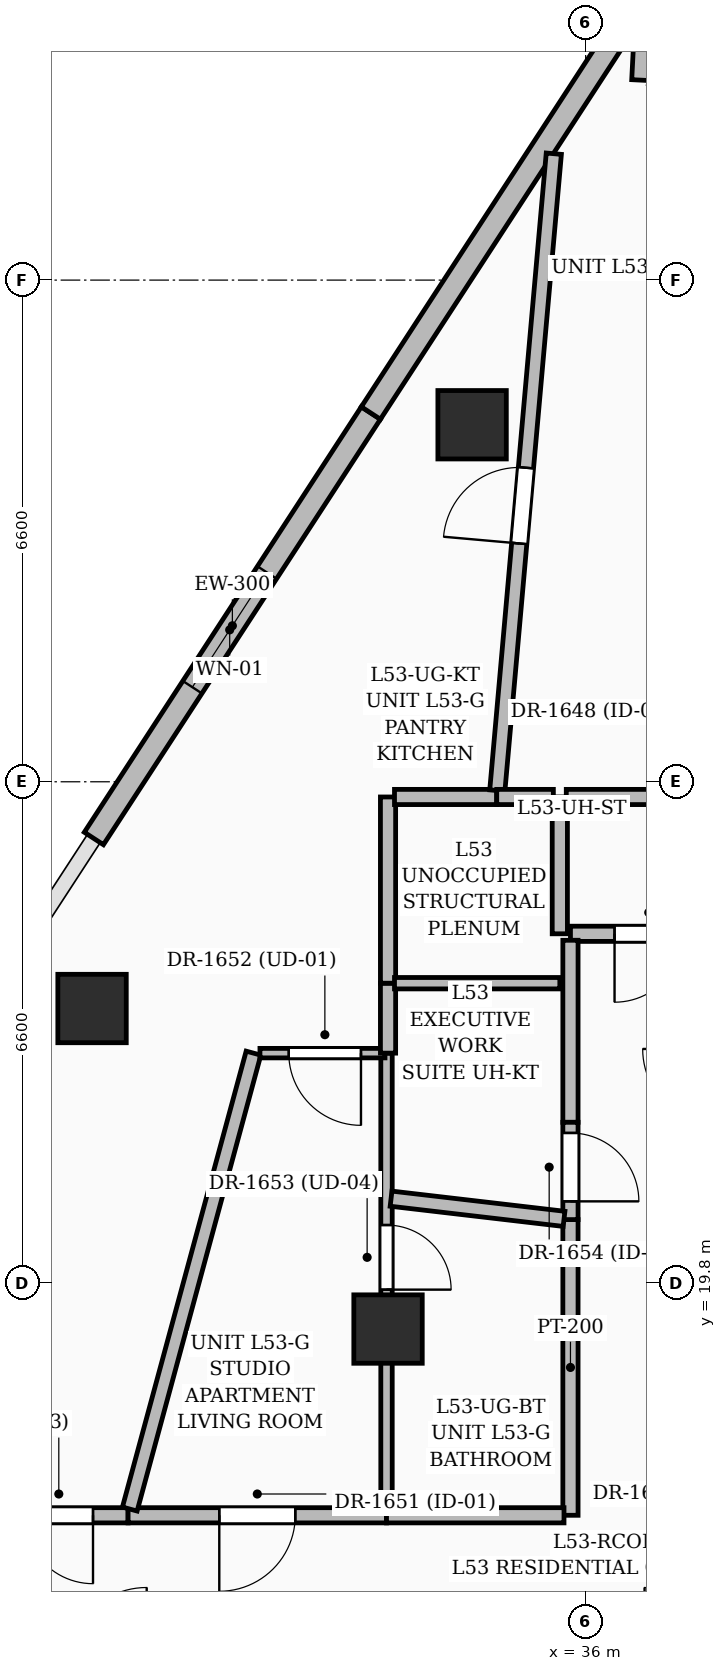
"""IFC4 building model, lengths in metres.
Left out: names, types, materials, properties, quantities, classifications, styles, units other than length and angle.
Written with IfcOpenShell. Run it as: python <this file> out.ifc"""

import sys

from ifc_helpers import new_model, si_unit, direction, frame, frame_2d, origin, origin_2d, place, context, subcontext, project, spatial, rectangle, extrude, element, fill, save


model = new_model("IFC4")
c1 = context("Model", 3, precision=1e-05, world=origin(), true_north=direction((0.0, 1.0)))
c2 = subcontext(c1, "Body", "Model", "MODEL_VIEW")
j1 = project(units=[si_unit("LENGTHUNIT", "METRE"), si_unit("PLANEANGLEUNIT", "RADIAN")], contexts=[c1])
p1 = place(None, origin())
s1 = spatial("IfcSite", under=j1, at=p1, CompositionType="ELEMENT")
p2 = place(p1, origin())
s2 = spatial("IfcBuilding", under=s1, at=p2, CompositionType="ELEMENT")
p3 = place(p2, frame((0.0, 0.0, 207.0)))
s3 = spatial("IfcBuildingStorey", under=s2, at=p3, CompositionType="ELEMENT", Elevation=207.0)
for number, where, z_axis, x_axis in (
    (1, (33.4, 19.2, 0.0), (0.0, 0.0, 1.0), (1.0, 0.0, 0.0)),
    (2, (34.506, 31.097, 0.0), (0.0, 0.0, 1.0), (1.0, 0.0, 0.0)),
    (3, (29.506, 23.417, 0.0), (0.0, 0.0, 1.0), (1.0, 0.0, 0.0)),
):
    element("IfcColumn", number, at=place(p3, frame(where, z_axis=z_axis, x_axis=x_axis)), inside=s3, PredefinedType="COLUMN", context=c2, shape_type="SweptSolid", body=[
        extrude(rectangle(XDim=0.9, YDim=0.9, at=origin_2d()), origin(), (0.0, 0.0, 1.0), 3.75),
    ])
p4 = place(p3, frame((29.53, 25.654, 0.0), z_axis=(0.0, 0.0, 1.0), x_axis=(0.545624217243, 0.838029959821, 0.0)))
e4 = element("IfcWall", 4, at=p4, inside=s3, PredefinedType="SOLIDWALL", context=c2, shape_type="SweptSolid", body=[
    extrude(rectangle(XDim=6.679, YDim=0.3, at=frame_2d((3.339, 0.0))), origin(), (0.0, 0.0, 1.0), 3.5),
])
p5 = place(p4, frame((2.375, 0.0, 0.6)))
e5 = element("IfcOpeningElement", 5, at=p5, cuts=e4, PredefinedType="OPENING", context=c2, shape_type="SweptSolid", body=[
    extrude(rectangle(XDim=1.8, YDim=2.1, at=frame_2d((0.9, 1.05))), frame((0.0, 0.16, 0.0), z_axis=(0.0, -1.0, 0.0), x_axis=(1.0, 0.0, 0.0)), (0.0, 0.0, 1.0), 0.32),
])
p6 = place(p3, frame((33.174, 31.251, 0.0), z_axis=(0.0, 0.0, 1.0), x_axis=(0.545624217243, 0.838029959821, 0.0)))
e6 = element("IfcWall", 6, at=p6, inside=s3, PredefinedType="SOLIDWALL", context=c2, shape_type="SweptSolid", body=[
    extrude(rectangle(XDim=6.679, YDim=0.3, at=frame_2d((3.339, 0.0))), origin(), (0.0, 0.0, 1.0), 3.5),
])
p7 = place(p3, frame((36.795, 36.394, 0.0), z_axis=(0.0, 0.0, 1.0), x_axis=(-0.051035290984, -0.998696850438, 0.0)))
e7 = element("IfcWall", 7, at=p7, inside=s3, PredefinedType="SOLIDWALL", context=c2, shape_type="SweptSolid", body=[
    extrude(rectangle(XDim=0.765, YDim=0.3, at=frame_2d((0.383, 0.0))), origin(), (0.0, 0.0, 1.0), 3.5),
])
p8 = place(p3, frame((29.98, 16.75, 0.0), z_axis=(0.0, 0.0, 1.0), x_axis=(-1.0, 0.0, 0.0)))
e8 = element("IfcWall", 8, at=p8, inside=s3, PredefinedType="PARTITIONING", context=c2, shape_type="SweptSolid", body=[
    extrude(rectangle(XDim=1.845, YDim=0.2, at=frame_2d((0.922, 0.0))), origin(), (0.0, 0.0, 1.0), 3.5),
])
p9 = place(p8, frame((0.461, 0.0, 0.0)))
e9 = element("IfcOpeningElement", 9, at=p9, cuts=e8, PredefinedType="OPENING", context=c2, shape_type="SweptSolid", body=[
    extrude(rectangle(XDim=0.9, YDim=2.1, at=frame_2d((0.45, 1.05))), frame((0.0, 0.11, 0.0), z_axis=(0.0, -1.0, 0.0), x_axis=(1.0, 0.0, 0.0)), (0.0, 0.0, 1.0), 0.22),
])
p10 = place(p3, frame((33.38, 16.75, 0.0), z_axis=(0.0, 0.0, 1.0), x_axis=(-1.0, 0.0, 0.0)))
e10 = element("IfcWall", 10, at=p10, inside=s3, PredefinedType="PARTITIONING", context=c2, shape_type="SweptSolid", body=[
    extrude(rectangle(XDim=3.4, YDim=0.2, at=frame_2d((1.7, 0.0))), origin(), (0.0, 0.0, 1.0), 3.5),
])
p11 = place(p10, frame((1.2, 0.0, 0.0)))
e11 = element("IfcOpeningElement", 11, at=p11, cuts=e10, PredefinedType="OPENING", context=c2, shape_type="SweptSolid", body=[
    extrude(rectangle(XDim=1.0, YDim=2.2, at=frame_2d((0.5, 1.1))), frame((0.0, 0.11, 0.0), z_axis=(0.0, -1.0, 0.0), x_axis=(1.0, 0.0, 0.0)), (0.0, 0.0, 1.0), 0.22),
])
p12 = place(p3, frame((35.8, 20.64, 0.0), z_axis=(0.0, 0.0, 1.0), x_axis=(0.0, -1.0, 0.0)))
e12 = element("IfcWall", 12, at=p12, inside=s3, PredefinedType="PARTITIONING", context=c2, shape_type="SweptSolid", body=[
    extrude(rectangle(XDim=3.89, YDim=0.2, at=frame_2d((1.945, 0.0))), origin(), (0.0, 0.0, 1.0), 3.003),
])
p13 = place(p3, frame((35.715, 16.75, 0.0), z_axis=(0.0, 0.0, 1.0), x_axis=(-1.0, 0.0, 0.0)))
e13 = element("IfcWall", 13, at=p13, inside=s3, PredefinedType="PARTITIONING", context=c2, shape_type="SweptSolid", body=[
    extrude(rectangle(XDim=2.335, YDim=0.2, at=frame_2d((1.167, 0.0))), origin(), (0.0, 0.0, 1.0), 2.685),
])
p14 = place(p3, frame((37.705, 24.4, 0.0), z_axis=(0.0, 0.0, 1.0), x_axis=(-1.0, 0.0, 0.0)))
e14 = element("IfcWall", 14, at=p14, inside=s3, PredefinedType="PARTITIONING", context=c2, shape_type="SweptSolid", body=[
    extrude(rectangle(XDim=1.905, YDim=0.2, at=frame_2d((0.953, 0.0))), origin(), (0.0, 0.0, 1.0), 2.685),
])
p15 = place(p14, frame((0.425, 0.0, 0.0)))
e15 = element("IfcOpeningElement", 15, at=p15, cuts=e14, PredefinedType="OPENING", context=c2, shape_type="SweptSolid", body=[
    extrude(rectangle(XDim=0.9, YDim=2.1, at=frame_2d((0.45, 1.05))), frame((0.0, 0.11, 0.0), z_axis=(0.0, -1.0, 0.0), x_axis=(1.0, 0.0, 0.0)), (0.0, 0.0, 1.0), 0.22),
])
p16 = place(p3, frame((35.8, 24.315, 0.0), z_axis=(0.0, 0.0, 1.0), x_axis=(0.0, -1.0, 0.0)))
e16 = element("IfcWall", 16, at=p16, inside=s3, PredefinedType="PARTITIONING", context=c2, shape_type="SweptSolid", body=[
    extrude(rectangle(XDim=2.395, YDim=0.2, at=frame_2d((1.198, 0.0))), origin(), (0.0, 0.0, 1.0), 2.685),
])
p17 = place(p3, frame((35.8, 21.92, 0.0), z_axis=(0.0, 0.0, 1.0), x_axis=(0.0, -1.0, 0.0)))
e17 = element("IfcWall", 17, at=p17, inside=s3, PredefinedType="PARTITIONING", context=c2, shape_type="SweptSolid", body=[
    extrude(rectangle(XDim=1.28, YDim=0.2, at=frame_2d((0.64, 0.0))), origin(), (0.0, 0.0, 1.0), 3.5),
])
p18 = place(p17, frame((0.14, 0.0, 0.0)))
e18 = element("IfcOpeningElement", 18, at=p18, cuts=e17, PredefinedType="OPENING", context=c2, shape_type="SweptSolid", body=[
    extrude(rectangle(XDim=0.9, YDim=2.1, at=frame_2d((0.45, 1.05))), frame((0.0, 0.11, 0.0), z_axis=(0.0, -1.0, 0.0), x_axis=(1.0, 0.0, 0.0)), (0.0, 0.0, 1.0), 0.22),
])
p19 = place(p3, frame((30.002, 16.832, 0.0), z_axis=(0.0, 0.0, 1.0), x_axis=(0.261897318596, 0.965095743702, 0.0)))
e19 = element("IfcWall", 19, at=p19, inside=s3, PredefinedType="PARTITIONING", context=c2, shape_type="SweptSolid", body=[
    extrude(rectangle(XDim=6.215, YDim=0.2, at=frame_2d((3.107, 0.0))), origin(), (0.0, 0.0, 1.0), 2.685),
])
p20 = place(p3, frame((33.38, 22.83, 0.0), z_axis=(0.0, 0.0, 1.0), x_axis=(0.0, -1.0, 0.0)))
e20 = element("IfcWall", 20, at=p20, inside=s3, PredefinedType="PARTITIONING", context=c2, shape_type="SweptSolid", body=[
    extrude(rectangle(XDim=5.995, YDim=0.15, at=frame_2d((2.998, 0.0))), origin(), (0.0, 0.0, 1.0), 2.685),
])
p21 = place(p20, frame((2.261, 0.0, 0.0)))
e21 = element("IfcOpeningElement", 21, at=p21, cuts=e20, PredefinedType="OPENING", context=c2, shape_type="SweptSolid", body=[
    extrude(rectangle(XDim=0.85, YDim=2.1, at=frame_2d((0.425, 1.05))), frame((0.0, 0.085, 0.0), z_axis=(0.0, -1.0, 0.0), x_axis=(1.0, 0.0, 0.0)), (0.0, 0.0, 1.0), 0.17),
])
p22 = place(p3, frame((33.36, 22.83, 0.0), z_axis=(0.0, 0.0, 1.0), x_axis=(-1.0, 0.0, 0.0)))
e22 = element("IfcWall", 22, at=p22, inside=s3, PredefinedType="PARTITIONING", context=c2, shape_type="SweptSolid", body=[
    extrude(rectangle(XDim=1.645, YDim=0.125, at=frame_2d((0.823, 0.0))), origin(), (0.0, 0.0, 1.0), 3.5),
])
p23 = place(p22, frame((0.316, 0.0, 0.0)))
e23 = element("IfcOpeningElement", 23, at=p23, cuts=e22, PredefinedType="OPENING", context=c2, shape_type="SweptSolid", body=[
    extrude(rectangle(XDim=0.95, YDim=2.2, at=frame_2d((0.475, 1.1))), frame((0.0, 0.072, 0.0), z_axis=(0.0, -1.0, 0.0), x_axis=(1.0, 0.0, 0.0)), (0.0, 0.0, 1.0), 0.145),
])
p24 = place(p3, frame((35.716, 20.65, 0.0), z_axis=(0.0, 0.0, 1.0), x_axis=(-0.993270086926, 0.11582113114, 0.0)))
e24 = element("IfcWall", 24, at=p24, inside=s3, PredefinedType="PARTITIONING", context=c2, shape_type="SweptSolid", body=[
    extrude(rectangle(XDim=2.291, YDim=0.2, at=frame_2d((1.146, 0.0))), origin(), (0.0, 0.0, 1.0), 2.685),
])
p25 = place(p3, frame((33.4, 22.83, 0.0), z_axis=(0.0, 0.0, 1.0), x_axis=(0.0, 1.0, 0.0)))
e25 = element("IfcWall", 25, at=p25, inside=s3, PredefinedType="PARTITIONING", context=c2, shape_type="SweptSolid", body=[
    extrude(rectangle(XDim=0.92, YDim=0.2, at=frame_2d((0.46, 0.0))), origin(), (0.0, 0.0, 1.0), 3.5),
])
p26 = place(p3, frame((33.4, 23.75, 0.0), z_axis=(0.0, 0.0, 1.0), x_axis=(0.0, 1.0, 0.0)))
e26 = element("IfcWall", 26, at=p26, inside=s3, PredefinedType="PARTITIONING", context=c2, shape_type="SweptSolid", body=[
    extrude(rectangle(XDim=2.45, YDim=0.2, at=frame_2d((1.225, 0.0))), origin(), (0.0, 0.0, 1.0), 3.061),
])
p27 = place(p3, frame((33.485, 26.2, 0.0), z_axis=(0.0, 0.0, 1.0), x_axis=(1.0, 0.0, 0.0)))
e27 = element("IfcWall", 27, at=p27, inside=s3, PredefinedType="PARTITIONING", context=c2, shape_type="SweptSolid", body=[
    extrude(rectangle(XDim=1.345, YDim=0.2, at=frame_2d((0.672, 0.0))), origin(), (0.0, 0.0, 1.0), 3.061),
])
p28 = place(p3, frame((34.838, 26.285, 0.0), z_axis=(0.0, 0.0, 1.0), x_axis=(0.088352923437, 0.996089233412, 0.0)))
e28 = element("IfcWall", 28, at=p28, inside=s3, PredefinedType="PARTITIONING", context=c2, shape_type="SweptSolid", body=[
    extrude(rectangle(XDim=8.411, YDim=0.2, at=frame_2d((4.206, 0.0))), origin(), (0.0, 0.0, 1.0), 2.685),
])
p29 = place(p28, frame((3.264, 0.0, 0.0)))
e29 = element("IfcOpeningElement", 29, at=p29, cuts=e28, PredefinedType="OPENING", context=c2, shape_type="SweptSolid", body=[
    extrude(rectangle(XDim=1.0, YDim=2.2, at=frame_2d((0.5, 1.1))), frame((0.0, 0.11, 0.0), z_axis=(0.0, -1.0, 0.0), x_axis=(1.0, 0.0, 0.0)), (0.0, 0.0, 1.0), 0.22),
])
p30 = place(p3, frame((35.66, 26.2, 0.0), z_axis=(0.0, 0.0, 1.0), x_axis=(0.0, -1.0, 0.0)))
e30 = element("IfcWall", 30, at=p30, inside=s3, PredefinedType="PARTITIONING", context=c2, shape_type="SweptSolid", body=[
    extrude(rectangle(XDim=1.8, YDim=0.2, at=frame_2d((0.9, 0.0))), origin(), (0.0, 0.0, 1.0), 3.061),
])
p31 = place(p3, frame((37.665, 26.2, 0.0), z_axis=(0.0, 0.0, 1.0), x_axis=(-1.0, 0.0, 0.0)))
e31 = element("IfcWall", 31, at=p31, inside=s3, PredefinedType="PARTITIONING", context=c2, shape_type="SweptSolid", body=[
    extrude(rectangle(XDim=1.92, YDim=0.2, at=frame_2d((0.96, 0.0))), origin(), (0.0, 0.0, 1.0), 3.061),
])
p32 = place(p3, frame((35.66, 23.75, 0.0), z_axis=(0.0, 0.0, 1.0), x_axis=(-1.0, 0.0, 0.0)))
e32 = element("IfcWall", 32, at=p32, inside=s3, PredefinedType="PARTITIONING", context=c2, shape_type="SweptSolid", body=[
    extrude(rectangle(XDim=2.175, YDim=0.15, at=frame_2d((1.087, 0.0))), origin(), (0.0, 0.0, 1.0), 3.061),
])
p33 = place(p3, frame((35.575, 26.2, 0.0), z_axis=(0.0, 0.0, 1.0), x_axis=(-1.0, 0.0, 0.0)))
e33 = element("IfcWall", 33, at=p33, inside=s3, PredefinedType="PARTITIONING", context=c2, shape_type="SweptSolid", body=[
    extrude(rectangle(XDim=0.745, YDim=0.2, at=frame_2d((0.373, 0.0))), origin(), (0.0, 0.0, 1.0), 3.061),
])
p34 = place(p5, origin())
e34 = element("IfcWindow", 34, at=p34, inside=s3, PartitioningType="SINGLE_PANEL", PredefinedType="WINDOW", context=c2, shape_type="SweptSolid", body=[
    extrude(rectangle(XDim=1.8, YDim=2.1, at=frame_2d((0.9, 1.05))), frame((0.0, 0.03, 0.0), z_axis=(0.0, -1.0, 0.0), x_axis=(1.0, 0.0, 0.0)), (0.0, 0.0, 1.0), 0.06),
])
fill(e5, e34)
p35 = place(p9, origin())
e35 = element("IfcDoor", 35, at=p35, inside=s3, OperationType="SINGLE_SWING_LEFT", PredefinedType="DOOR", context=c2, shape_type="SweptSolid", body=[
    extrude(rectangle(XDim=0.9, YDim=2.1, at=frame_2d((0.45, 1.05))), frame((0.0, 0.025, 0.0), z_axis=(0.0, -1.0, 0.0), x_axis=(1.0, 0.0, 0.0)), (0.0, 0.0, 1.0), 0.05),
])
fill(e9, e35)
p36 = place(p15, origin())
e36 = element("IfcDoor", 36, at=p36, inside=s3, OperationType="SINGLE_SWING_RIGHT", PredefinedType="DOOR", context=c2, shape_type="SweptSolid", body=[
    extrude(rectangle(XDim=0.9, YDim=2.1, at=frame_2d((0.45, 1.05))), frame((0.0, 0.025, 0.0), z_axis=(0.0, -1.0, 0.0), x_axis=(1.0, 0.0, 0.0)), (0.0, 0.0, 1.0), 0.05),
])
fill(e15, e36)
p37 = place(p11, origin())
e37 = element("IfcDoor", 37, at=p37, inside=s3, OperationType="SINGLE_SWING_RIGHT", PredefinedType="DOOR", context=c2, shape_type="SweptSolid", body=[
    extrude(rectangle(XDim=1.0, YDim=2.2, at=frame_2d((0.5, 1.1))), frame((0.0, 0.025, 0.0), z_axis=(0.0, -1.0, 0.0), x_axis=(1.0, 0.0, 0.0)), (0.0, 0.0, 1.0), 0.05),
])
fill(e11, e37)
p38 = place(p23, origin())
e38 = element("IfcDoor", 38, at=p38, inside=s3, OperationType="SINGLE_SWING_LEFT", PredefinedType="DOOR", context=c2, shape_type="SweptSolid", body=[
    extrude(rectangle(XDim=0.95, YDim=2.2, at=frame_2d((0.475, 1.1))), frame((0.0, 0.025, 0.0), z_axis=(0.0, -1.0, 0.0), x_axis=(1.0, 0.0, 0.0)), (0.0, 0.0, 1.0), 0.05),
])
fill(e23, e38)
p39 = place(p21, origin())
e39 = element("IfcDoor", 39, at=p39, inside=s3, OperationType="SINGLE_SWING_RIGHT", PredefinedType="DOOR", context=c2, shape_type="SweptSolid", body=[
    extrude(rectangle(XDim=0.85, YDim=2.1, at=frame_2d((0.425, 1.05))), frame((0.0, 0.025, 0.0), z_axis=(0.0, -1.0, 0.0), x_axis=(1.0, 0.0, 0.0)), (0.0, 0.0, 1.0), 0.05),
])
fill(e21, e39)
p40 = place(p18, origin())
e40 = element("IfcDoor", 40, at=p40, inside=s3, OperationType="SINGLE_SWING_RIGHT", PredefinedType="DOOR", context=c2, shape_type="SweptSolid", body=[
    extrude(rectangle(XDim=0.9, YDim=2.1, at=frame_2d((0.45, 1.05))), frame((0.0, 0.025, 0.0), z_axis=(0.0, -1.0, 0.0), x_axis=(1.0, 0.0, 0.0)), (0.0, 0.0, 1.0), 0.05),
])
fill(e18, e40)
p41 = place(p29, origin())
e41 = element("IfcDoor", 41, at=p41, inside=s3, OperationType="SINGLE_SWING_LEFT", PredefinedType="DOOR", context=c2, shape_type="SweptSolid", body=[
    extrude(rectangle(XDim=1.0, YDim=2.2, at=frame_2d((0.5, 1.1))), frame((0.0, 0.025, 0.0), z_axis=(0.0, -1.0, 0.0), x_axis=(1.0, 0.0, 0.0)), (0.0, 0.0, 1.0), 0.05),
])
fill(e29, e41)
save(model, sys.argv[1])
